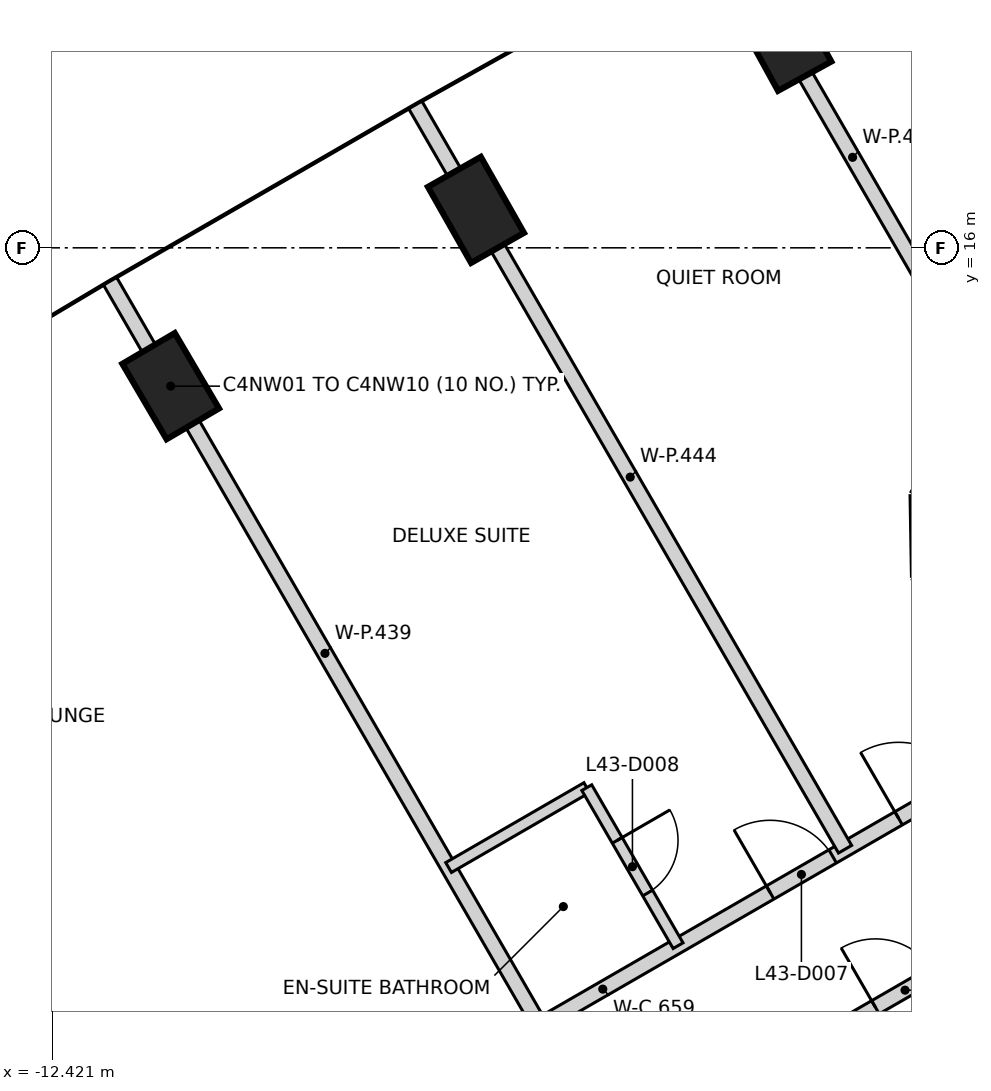
"""IFC4 building model, lengths in metres.
Left out: names, types, materials, properties, quantities, classifications, styles, units other than length and angle.
Written with IfcOpenShell. Run it as: python <this file> out.ifc"""

import sys

from ifc_helpers import new_model, si_unit, direction, frame, frame_2d, origin, origin_2d, place, context, subcontext, project, spatial, rectangle, extrude, element, fill, save


model = new_model("IFC4")
c1 = context("Model", 3, precision=1e-05, world=origin(), true_north=direction((0.0, 1.0)))
c2 = subcontext(c1, "Body", "Model", "MODEL_VIEW")
j1 = project(units=[si_unit("LENGTHUNIT", "METRE"), si_unit("PLANEANGLEUNIT", "RADIAN")], contexts=[c1])
p1 = place(None, origin())
s1 = spatial("IfcSite", under=j1, at=p1, CompositionType="ELEMENT")
p2 = place(p1, origin())
s2 = spatial("IfcBuilding", under=s1, at=p2, CompositionType="ELEMENT")
p3 = place(p2, frame((0.0, 0.0, 175.6)))
s3 = spatial("IfcBuildingStorey", under=s2, at=p3, CompositionType="ELEMENT", Elevation=175.6)
for number, where, z_axis, x_axis in (
    (1, (-2.8, 18.762, -0.35), (0.0, 0.0, 1.0), (-0.482, 0.876, 0.0)),
    (2, (-6.848, 16.499, -0.35), (0.0, 0.0, 1.0), (-0.494, 0.87, 0.0)),
    (3, (-10.864, 14.18, -0.35), (0.0, 0.0, 1.0), (-0.506, 0.862, 0.0)),
):
    element("IfcColumn", number, at=place(p3, frame(where, z_axis=z_axis, x_axis=x_axis)), inside=s3, PredefinedType="COLUMN", context=c2, shape_type="SweptSolid", body=[
        extrude(rectangle(XDim=1.15, YDim=0.8, at=origin_2d()), origin(), (0.0, 0.0, 1.0), 3.6),
    ])
p4 = place(p3, frame((-10.652, 3.088, 0.0), z_axis=(0.0, 0.0, 1.0), x_axis=(0.866031821623, 0.499988883812, 0.0)))
e4 = element("IfcWall", 4, at=p4, inside=s3, PredefinedType="PARTITIONING", context=c2, shape_type="SweptSolid", body=[
    extrude(rectangle(XDim=12.638, YDim=0.2, at=frame_2d((6.319, 0.0))), origin(), (0.0, 0.0, 1.0), 3.25),
])
p5 = place(p4, frame((10.813, 0.0, 0.0)))
e5 = element("IfcOpeningElement", 5, at=p5, cuts=e4, PredefinedType="OPENING", context=c2, shape_type="SweptSolid", body=[
    extrude(rectangle(XDim=1.0, YDim=2.1, at=frame_2d((0.5, 1.05))), frame((0.0, 0.11, 0.0), z_axis=(0.0, -1.0, 0.0), x_axis=(1.0, 0.0, 0.0)), (0.0, 0.0, 1.0), 0.22),
])
p6 = place(p4, frame((8.862, 0.0, 0.0)))
e6 = element("IfcOpeningElement", 6, at=p6, cuts=e4, PredefinedType="OPENING", context=c2, shape_type="SweptSolid", body=[
    extrude(rectangle(XDim=0.95, YDim=2.1, at=frame_2d((0.475, 1.05))), frame((0.0, 0.11, 0.0), z_axis=(0.0, -1.0, 0.0), x_axis=(1.0, 0.0, 0.0)), (0.0, 0.0, 1.0), 0.22),
])
p7 = place(p4, frame((2.153, 0.0, 0.0)))
e7 = element("IfcOpeningElement", 7, at=p7, cuts=e4, PredefinedType="OPENING", context=c2, shape_type="SweptSolid", body=[
    extrude(rectangle(XDim=1.0, YDim=2.1, at=frame_2d((0.5, 1.05))), frame((0.0, 0.11, 0.0), z_axis=(0.0, -1.0, 0.0), x_axis=(1.0, 0.0, 0.0)), (0.0, 0.0, 1.0), 0.22),
])
p8 = place(p3, frame((-8.612, 1.956, 0.0), z_axis=(0.0, 0.0, 1.0), x_axis=(0.866034386606, 0.499984440973, 0.0)))
e8 = element("IfcWall", 8, at=p8, inside=s3, PredefinedType="PARTITIONING", context=c2, shape_type="SweptSolid", body=[
    extrude(rectangle(XDim=12.96, YDim=0.2, at=frame_2d((6.48, 0.0))), origin(), (0.0, 0.0, 1.0), 3.25),
])
p9 = place(p8, frame((8.105, 0.0, 0.0)))
e9 = element("IfcOpeningElement", 9, at=p9, cuts=e8, PredefinedType="OPENING", context=c2, shape_type="SweptSolid", body=[
    extrude(rectangle(XDim=0.9, YDim=2.1, at=frame_2d((0.45, 1.05))), frame((0.0, 0.11, 0.0), z_axis=(0.0, -1.0, 0.0), x_axis=(1.0, 0.0, 0.0)), (0.0, 0.0, 1.0), 0.22),
])
p10 = place(p8, frame((1.637, 0.0, 0.0)))
e10 = element("IfcOpeningElement", 10, at=p10, cuts=e8, PredefinedType="OPENING", context=c2, shape_type="SweptSolid", body=[
    extrude(rectangle(XDim=0.9, YDim=2.1, at=frame_2d((0.45, 1.05))), frame((0.0, 0.11, 0.0), z_axis=(0.0, -1.0, 0.0), x_axis=(1.0, 0.0, 0.0)), (0.0, 0.0, 1.0), 0.22),
])
p11 = place(p3, frame((-1.037, 12.741, 0.0), z_axis=(0.0, 0.0, 1.0), x_axis=(0.017040362824, -0.999854802476, 0.0)))
e11 = element("IfcWall", 11, at=p11, inside=s3, PredefinedType="PARTITIONING", context=c2, shape_type="SweptSolid", body=[
    extrude(rectangle(XDim=1.06, YDim=0.2, at=frame_2d((0.53, 0.0))), origin(), (0.0, 0.0, 1.0), 3.25),
])
p12 = place(p3, frame((-11.661, 15.561, 0.0), z_axis=(0.0, 0.0, 1.0), x_axis=(0.499987250653, -0.866032764498, 0.0)))
e12 = element("IfcWall", 12, at=p12, inside=s3, PredefinedType="PARTITIONING", context=c2, shape_type="SweptSolid", body=[
    extrude(rectangle(XDim=11.306, YDim=0.2, at=frame_2d((5.653, 0.0))), origin(), (0.0, 0.0, 1.0), 3.25),
])
p13 = place(p3, frame((-7.6, 0.924, 0.0), z_axis=(0.0, 0.0, 1.0), x_axis=(0.866028806638, 0.499994106039, 0.0)))
e13 = element("IfcWall", 13, at=p13, inside=s3, PredefinedType="PARTITIONING", context=c2, shape_type="SweptSolid", body=[
    extrude(rectangle(XDim=12.24, YDim=0.2, at=frame_2d((6.12, 0.0))), origin(), (0.0, 0.0, 1.0), 3.25),
])
p14 = place(p3, frame((-7.646, 17.879, 0.0), z_axis=(0.0, 0.0, 1.0), x_axis=(0.500047691386, -0.865997867399, 0.0)))
e14 = element("IfcWall", 14, at=p14, inside=s3, PredefinedType="PARTITIONING", context=c2, shape_type="SweptSolid", body=[
    extrude(rectangle(XDim=11.306, YDim=0.2, at=frame_2d((5.653, 0.0))), origin(), (0.0, 0.0, 1.0), 3.25),
])
p15 = place(p3, frame((-3.598, 20.142, 0.0), z_axis=(0.0, 0.0, 1.0), x_axis=(0.500075890333, -0.865981584047, 0.0)))
e15 = element("IfcWall", 15, at=p15, inside=s3, PredefinedType="PARTITIONING", context=c2, shape_type="SweptSolid", body=[
    extrude(rectangle(XDim=6.816, YDim=0.2, at=frame_2d((3.408, 0.0))), origin(), (0.0, 0.0, 1.0), 3.25),
])
p16 = place(p3, frame((-7.208, 7.847, 0.0), z_axis=(0.0, 0.0, 1.0), x_axis=(0.865749785376, 0.500477081515, 0.0)))
e16 = element("IfcWall", 16, at=p16, inside=s3, PredefinedType="PARTITIONING", context=c2, shape_type="SweptSolid", body=[
    extrude(rectangle(XDim=2.1, YDim=0.15, at=frame_2d((1.05, 0.0))), origin(), (0.0, 0.0, 1.0), 3.25),
])
p17 = place(p3, frame((-5.39, 8.898, 0.0), z_axis=(0.0, 0.0, 1.0), x_axis=(0.500218298882, -0.865899332177, 0.0)))
e17 = element("IfcWall", 17, at=p17, inside=s3, PredefinedType="PARTITIONING", context=c2, shape_type="SweptSolid", body=[
    extrude(rectangle(XDim=2.401, YDim=0.15, at=frame_2d((1.2, 0.0))), origin(), (0.0, 0.0, 1.0), 3.25),
])
p18 = place(p17, frame((0.801, 0.0, 0.0)))
e18 = element("IfcOpeningElement", 18, at=p18, cuts=e17, PredefinedType="OPENING", context=c2, shape_type="SweptSolid", body=[
    extrude(rectangle(XDim=0.8, YDim=2.1, at=frame_2d((0.4, 1.05))), frame((0.0, 0.085, 0.0), z_axis=(0.0, -1.0, 0.0), x_axis=(1.0, 0.0, 0.0)), (0.0, 0.0, 1.0), 0.17),
])
p19 = place(p5, origin())
e19 = element("IfcDoor", 19, at=p19, inside=s3, OperationType="SINGLE_SWING_LEFT", PredefinedType="DOOR", context=c2, shape_type="SweptSolid", body=[
    extrude(rectangle(XDim=1.0, YDim=2.1, at=frame_2d((0.5, 1.05))), frame((0.0, 0.025, 0.0), z_axis=(0.0, -1.0, 0.0), x_axis=(1.0, 0.0, 0.0)), (0.0, 0.0, 1.0), 0.05),
])
fill(e5, e19)
p20 = place(p6, origin())
e20 = element("IfcDoor", 20, at=p20, inside=s3, OperationType="SINGLE_SWING_LEFT", PredefinedType="DOOR", context=c2, shape_type="SweptSolid", body=[
    extrude(rectangle(XDim=0.95, YDim=2.1, at=frame_2d((0.475, 1.05))), frame((0.0, 0.025, 0.0), z_axis=(0.0, -1.0, 0.0), x_axis=(1.0, 0.0, 0.0)), (0.0, 0.0, 1.0), 0.05),
])
fill(e6, e20)
p21 = place(p18, origin())
e21 = element("IfcDoor", 21, at=p21, inside=s3, OperationType="SINGLE_SWING_LEFT", PredefinedType="DOOR", context=c2, shape_type="SweptSolid", body=[
    extrude(rectangle(XDim=0.8, YDim=2.1, at=frame_2d((0.4, 1.05))), frame((0.0, 0.025, 0.0), z_axis=(0.0, -1.0, 0.0), x_axis=(1.0, 0.0, 0.0)), (0.0, 0.0, 1.0), 0.05),
])
fill(e18, e21)
p22 = place(p9, frame((0.9, 0.0, 0.0), z_axis=(0.0, 0.0, 1.0), x_axis=(-1.0, 0.0, 0.0)))
e22 = element("IfcDoor", 22, at=p22, inside=s3, OperationType="SINGLE_SWING_LEFT", PredefinedType="DOOR", context=c2, shape_type="SweptSolid", body=[
    extrude(rectangle(XDim=0.9, YDim=2.1, at=frame_2d((0.45, 1.05))), frame((0.0, 0.025, 0.0), z_axis=(0.0, -1.0, 0.0), x_axis=(1.0, 0.0, 0.0)), (0.0, 0.0, 1.0), 0.05),
])
fill(e9, e22)
save(model, sys.argv[1])
